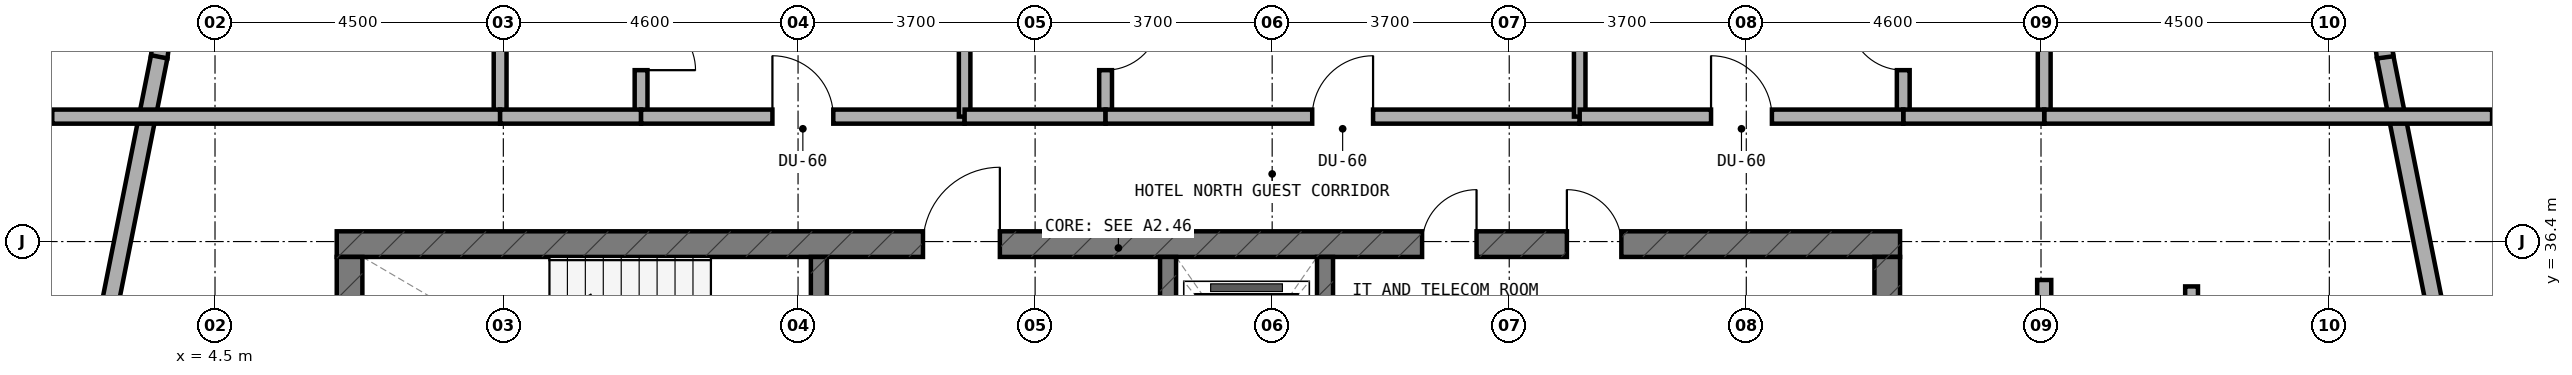
"""IFC4 building model, lengths in metres.
Left out: names, types, materials, properties, quantities, classifications, styles, units other than length and angle.
Written with IfcOpenShell. Run it as: python <this file> out.ifc"""

import sys

from ifc_helpers import new_model, si_unit, direction, frame, frame_2d, origin, place, context, subcontext, project, spatial, rectangle, extrude, element, fill, save


model = new_model("IFC4")
c1 = context("Model", 3, precision=1e-05, world=origin(), true_north=direction((0.0, 1.0)))
c2 = subcontext(c1, "Body", "Model", "MODEL_VIEW")
j1 = project(units=[si_unit("LENGTHUNIT", "METRE"), si_unit("PLANEANGLEUNIT", "RADIAN")], contexts=[c1])
p1 = place(None, origin())
s1 = spatial("IfcSite", under=j1, at=p1, CompositionType="ELEMENT")
p2 = place(p1, origin())
s2 = spatial("IfcBuilding", under=s1, at=p2, CompositionType="ELEMENT")
p3 = place(p2, frame((0.0, 0.0, 217.1)))
s3 = spatial("IfcBuildingStorey", under=s2, at=p3, CompositionType="ELEMENT", Elevation=217.1)
p4 = place(p3, frame((6.4, 36.36, 0.0), z_axis=(0.0, 0.0, 1.0), x_axis=(1.0, 0.0, 0.0)))
e1 = element("IfcWall", 1, at=p4, inside=s3, PredefinedType="SHEAR", context=c2, shape_type="SweptSolid", body=[
    extrude(rectangle(XDim=24.4, YDim=0.4, at=frame_2d((12.2, 0.0))), origin(), (0.0, 0.0, 1.0), 3.6),
])
p5 = place(p4, frame((9.15, 0.0, 0.0)))
e2 = element("IfcOpeningElement", 2, at=p5, cuts=e1, PredefinedType="OPENING", context=c2, shape_type="SweptSolid", body=[
    extrude(rectangle(XDim=1.2, YDim=2.15, at=frame_2d((0.6, 1.075))), frame((0.0, 0.21, 0.0), z_axis=(0.0, -1.0, 0.0), x_axis=(1.0, 0.0, 0.0)), (0.0, 0.0, 1.0), 0.42),
])
p6 = place(p4, frame((19.2, 0.0, 0.0)))
e3 = element("IfcOpeningElement", 3, at=p6, cuts=e1, PredefinedType="OPENING", context=c2, shape_type="SweptSolid", body=[
    extrude(rectangle(XDim=0.85, YDim=2.1, at=frame_2d((0.425, 1.05))), frame((0.0, 0.21, 0.0), z_axis=(0.0, -1.0, 0.0), x_axis=(1.0, 0.0, 0.0)), (0.0, 0.0, 1.0), 0.42),
])
p7 = place(p4, frame((16.94, 0.0, 0.0)))
e4 = element("IfcOpeningElement", 4, at=p7, cuts=e1, PredefinedType="OPENING", context=c2, shape_type="SweptSolid", body=[
    extrude(rectangle(XDim=0.85, YDim=2.1, at=frame_2d((0.425, 1.05))), frame((0.0, 0.21, 0.0), z_axis=(0.0, -1.0, 0.0), x_axis=(1.0, 0.0, 0.0)), (0.0, 0.0, 1.0), 0.42),
])
for number, where, z_axis, x_axis in (
    (5, (6.6, 33.0, 0.0), (0.0, 0.0, 1.0), (0.0, 1.0, 0.0)),
    (6, (30.6, 33.0, 0.0), (0.0, 0.0, 1.0), (0.0, 1.0, 0.0)),
):
    element("IfcWall", number, at=place(p3, frame(where, z_axis=z_axis, x_axis=x_axis)), inside=s3, PredefinedType="SHEAR", context=c2, shape_type="SweptSolid", body=[
        extrude(rectangle(XDim=3.16, YDim=0.4, at=frame_2d((1.58, 0.0))), origin(), (0.0, 0.0, 1.0), 3.6),
    ])
p8 = place(p3, frame((13.925, 33.0, 0.0), z_axis=(0.0, 0.0, 1.0), x_axis=(0.0, 1.0, 0.0)))
e7 = element("IfcWall", 7, at=p8, inside=s3, PredefinedType="STANDARD", context=c2, shape_type="SweptSolid", body=[
    extrude(rectangle(XDim=3.16, YDim=0.25, at=frame_2d((1.58, 0.0))), origin(), (0.0, 0.0, 1.0), 3.32),
])
p9 = place(p8, frame((0.98, 0.0, 0.0)))
e8 = element("IfcOpeningElement", 8, at=p9, cuts=e7, PredefinedType="OPENING", context=c2, shape_type="SweptSolid", body=[
    extrude(rectangle(XDim=1.1, YDim=2.15, at=frame_2d((0.55, 1.075))), frame((0.0, 0.135, 0.0), z_axis=(0.0, -1.0, 0.0), x_axis=(1.0, 0.0, 0.0)), (0.0, 0.0, 1.0), 0.27),
])
p10 = place(p3, frame((19.375, 33.0, 0.0), z_axis=(0.0, 0.0, 1.0), x_axis=(0.0, 1.0, 0.0)))
e9 = element("IfcWall", 9, at=p10, inside=s3, PredefinedType="STANDARD", context=c2, shape_type="SweptSolid", body=[
    extrude(rectangle(XDim=3.16, YDim=0.25, at=frame_2d((1.58, 0.0))), origin(), (0.0, 0.0, 1.0), 3.32),
])
p11 = place(p10, frame((0.98, 0.0, 0.0)))
e10 = element("IfcOpeningElement", 10, at=p11, cuts=e9, PredefinedType="OPENING", context=c2, shape_type="SweptSolid", body=[
    extrude(rectangle(XDim=1.1, YDim=2.15, at=frame_2d((0.55, 1.075))), frame((0.0, 0.135, 0.0), z_axis=(0.0, -1.0, 0.0), x_axis=(1.0, 0.0, 0.0)), (0.0, 0.0, 1.0), 0.27),
])
p12 = place(p3, frame((21.825, 33.0, 0.0), z_axis=(0.0, 0.0, 1.0), x_axis=(0.0, 1.0, 0.0)))
e11 = element("IfcWall", 11, at=p12, inside=s3, PredefinedType="STANDARD", context=c2, shape_type="SweptSolid", body=[
    extrude(rectangle(XDim=3.16, YDim=0.25, at=frame_2d((1.58, 0.0))), origin(), (0.0, 0.0, 1.0), 3.32),
])
p13 = place(p3, frame((40.084, 30.681, 0.0), z_axis=(0.0, 0.0, 1.0), x_axis=(-0.195291715883, 0.980745199176, 0.0)))
e12 = element("IfcWall", 12, at=p13, inside=s3, PredefinedType="STANDARD", context=c2, shape_type="SweptSolid", body=[
    extrude(rectangle(XDim=8.771, YDim=0.26, at=frame_2d((4.385, 0.0))), origin(), (0.0, 0.0, 1.0), 3.32),
])
p14 = place(p13, frame((2.798, 0.0, 0.85)))
e13 = element("IfcOpeningElement", 13, at=p14, cuts=e12, PredefinedType="OPENING", context=c2, shape_type="SweptSolid", body=[
    extrude(rectangle(XDim=2.1, YDim=1.5, at=frame_2d((1.05, 0.75))), frame((0.0, 0.14, 0.0), z_axis=(0.0, -1.0, 0.0), x_axis=(1.0, 0.0, 0.0)), (0.0, 0.0, 1.0), 0.28),
])
p15 = place(p3, frame((38.372, 39.275, 0.0), z_axis=(0.0, 0.0, 1.0), x_axis=(-0.130954667764, 0.9913883573, 0.0)))
e14 = element("IfcWall", 14, at=p15, inside=s3, PredefinedType="STANDARD", context=c2, shape_type="SweptSolid", body=[
    extrude(rectangle(XDim=0.833, YDim=0.26, at=frame_2d((0.417, 0.0))), origin(), (0.0, 0.0, 1.0), 3.32),
])
p16 = place(p3, frame((3.741, 40.136, 0.0), z_axis=(0.0, 0.0, 1.0), x_axis=(-0.130156359936, -0.991493480548, 0.0)))
e15 = element("IfcWall", 15, at=p16, inside=s3, PredefinedType="STANDARD", context=c2, shape_type="SweptSolid", body=[
    extrude(rectangle(XDim=0.868, YDim=0.26, at=frame_2d((0.434, 0.0))), origin(), (0.0, 0.0, 1.0), 3.32),
])
p17 = place(p3, frame((3.629, 39.283, 0.0), z_axis=(0.0, 0.0, 1.0), x_axis=(-0.195291715883, -0.980745199176, 0.0)))
e16 = element("IfcWall", 16, at=p17, inside=s3, PredefinedType="STANDARD", context=c2, shape_type="SweptSolid", body=[
    extrude(rectangle(XDim=8.771, YDim=0.26, at=frame_2d((4.385, 0.0))), origin(), (0.0, 0.0, 1.0), 3.32),
])
p18 = place(p17, frame((3.873, 0.0, 0.85)))
e17 = element("IfcOpeningElement", 17, at=p18, cuts=e16, PredefinedType="OPENING", context=c2, shape_type="SweptSolid", body=[
    extrude(rectangle(XDim=2.1, YDim=1.5, at=frame_2d((1.05, 0.75))), frame((0.0, 0.14, 0.0), z_axis=(0.0, -1.0, 0.0), x_axis=(1.0, 0.0, 0.0)), (0.0, 0.0, 1.0), 0.28),
])
p19 = place(p3, frame((11.15, 38.45, 0.0), z_axis=(0.0, 0.0, 1.0), x_axis=(0.0, 1.0, 0.0)))
e18 = element("IfcWall", 18, at=p19, inside=s3, PredefinedType="PLUMBINGWALL", context=c2, shape_type="SweptSolid", body=[
    extrude(rectangle(XDim=2.1, YDim=0.2, at=frame_2d((1.05, 0.0))), origin(), (0.0, 0.0, 1.0), 2.995),
])
p20 = place(p19, frame((0.625, 0.0, 0.0)))
e19 = element("IfcOpeningElement", 19, at=p20, cuts=e18, PredefinedType="OPENING", context=c2, shape_type="SweptSolid", body=[
    extrude(rectangle(XDim=0.85, YDim=2.1, at=frame_2d((0.425, 1.05))), frame((0.0, 0.11, 0.0), z_axis=(0.0, -1.0, 0.0), x_axis=(1.0, 0.0, 0.0)), (0.0, 0.0, 1.0), 0.22),
])
p21 = place(p3, frame((8.95, 38.45, 0.0), z_axis=(0.0, 0.0, 1.0), x_axis=(0.0, 1.0, 0.0)))
e20 = element("IfcWall", 20, at=p21, inside=s3, PredefinedType="PLUMBINGWALL", context=c2, shape_type="SweptSolid", body=[
    extrude(rectangle(XDim=2.1, YDim=0.2, at=frame_2d((1.05, 0.0))), origin(), (0.0, 0.0, 1.0), 2.995),
])
p22 = place(p3, frame((1.96, 38.35, 0.0), z_axis=(0.0, 0.0, 1.0), x_axis=(1.0, 0.0, 0.0)))
e21 = element("IfcWall", 21, at=p22, inside=s3, PredefinedType="SOLIDWALL", context=c2, shape_type="SweptSolid", body=[
    extrude(rectangle(XDim=6.99, YDim=0.22, at=frame_2d((3.495, 0.0))), origin(), (0.0, 0.0, 1.0), 2.695),
])
p23 = place(p3, frame((8.95, 38.35, 0.0), z_axis=(0.0, 0.0, 1.0), x_axis=(1.0, 0.0, 0.0)))
e22 = element("IfcWall", 22, at=p23, inside=s3, PredefinedType="SOLIDWALL", context=c2, shape_type="SweptSolid", body=[
    extrude(rectangle(XDim=2.2, YDim=0.22, at=frame_2d((1.1, 0.0))), origin(), (0.0, 0.0, 1.0), 3.32),
])
p24 = place(p3, frame((11.15, 38.35, 0.0), z_axis=(0.0, 0.0, 1.0), x_axis=(1.0, 0.0, 0.0)))
e23 = element("IfcWall", 23, at=p24, inside=s3, PredefinedType="SOLIDWALL", context=c2, shape_type="SweptSolid", body=[
    extrude(rectangle(XDim=5.05, YDim=0.22, at=frame_2d((2.525, 0.0))), origin(), (0.0, 0.0, 1.0), 2.695),
])
p25 = place(p24, frame((2.05, 0.0, 0.0)))
e24 = element("IfcOpeningElement", 24, at=p25, cuts=e23, PredefinedType="OPENING", context=c2, shape_type="SweptSolid", body=[
    extrude(rectangle(XDim=0.95, YDim=2.1, at=frame_2d((0.475, 1.05))), frame((0.0, 0.12, 0.0), z_axis=(0.0, -1.0, 0.0), x_axis=(1.0, 0.0, 0.0)), (0.0, 0.0, 1.0), 0.24),
])
p26 = place(p3, frame((16.2, 38.35, 0.0), z_axis=(0.0, 0.0, 1.0), x_axis=(0.0, 1.0, 0.0)))
e25 = element("IfcWall", 25, at=p26, inside=s3, PredefinedType="SOLIDWALL", context=c2, shape_type="SweptSolid", body=[
    extrude(rectangle(XDim=5.79, YDim=0.18, at=frame_2d((2.895, 0.0))), origin(), (0.0, 0.0, 1.0), 2.695),
])
p27 = place(p3, frame((18.4, 38.45, 0.0), z_axis=(0.0, 0.0, 1.0), x_axis=(0.0, 1.0, 0.0)))
e26 = element("IfcWall", 26, at=p27, inside=s3, PredefinedType="PLUMBINGWALL", context=c2, shape_type="SweptSolid", body=[
    extrude(rectangle(XDim=2.1, YDim=0.2, at=frame_2d((1.05, 0.0))), origin(), (0.0, 0.0, 1.0), 2.995),
])
p28 = place(p27, frame((0.625, 0.0, 0.0)))
e27 = element("IfcOpeningElement", 27, at=p28, cuts=e26, PredefinedType="OPENING", context=c2, shape_type="SweptSolid", body=[
    extrude(rectangle(XDim=0.85, YDim=2.1, at=frame_2d((0.425, 1.05))), frame((0.0, 0.11, 0.0), z_axis=(0.0, -1.0, 0.0), x_axis=(1.0, 0.0, 0.0)), (0.0, 0.0, 1.0), 0.22),
])
p29 = place(p3, frame((16.2, 38.35, 0.0), z_axis=(0.0, 0.0, 1.0), x_axis=(1.0, 0.0, 0.0)))
e28 = element("IfcWall", 28, at=p29, inside=s3, PredefinedType="SOLIDWALL", context=c2, shape_type="SweptSolid", body=[
    extrude(rectangle(XDim=2.2, YDim=0.22, at=frame_2d((1.1, 0.0))), origin(), (0.0, 0.0, 1.0), 2.695),
])
p30 = place(p3, frame((18.4, 38.35, 0.0), z_axis=(0.0, 0.0, 1.0), x_axis=(1.0, 0.0, 0.0)))
e29 = element("IfcWall", 29, at=p30, inside=s3, PredefinedType="SOLIDWALL", context=c2, shape_type="SweptSolid", body=[
    extrude(rectangle(XDim=7.4, YDim=0.22, at=frame_2d((3.7, 0.0))), origin(), (0.0, 0.0, 1.0), 2.695),
])
p31 = place(p30, frame((3.225, 0.0, 0.0)))
e30 = element("IfcOpeningElement", 30, at=p31, cuts=e29, PredefinedType="OPENING", context=c2, shape_type="SweptSolid", body=[
    extrude(rectangle(XDim=0.95, YDim=2.1, at=frame_2d((0.475, 1.05))), frame((0.0, 0.12, 0.0), z_axis=(0.0, -1.0, 0.0), x_axis=(1.0, 0.0, 0.0)), (0.0, 0.0, 1.0), 0.24),
])
p32 = place(p3, frame((25.8, 38.35, 0.0), z_axis=(0.0, 0.0, 1.0), x_axis=(0.0, 1.0, 0.0)))
e31 = element("IfcWall", 31, at=p32, inside=s3, PredefinedType="SOLIDWALL", context=c2, shape_type="SweptSolid", body=[
    extrude(rectangle(XDim=5.79, YDim=0.18, at=frame_2d((2.895, 0.0))), origin(), (0.0, 0.0, 1.0), 2.695),
])
p33 = place(p3, frame((30.85, 38.45, 0.0), z_axis=(0.0, 0.0, 1.0), x_axis=(0.0, 1.0, 0.0)))
e32 = element("IfcWall", 32, at=p33, inside=s3, PredefinedType="PLUMBINGWALL", context=c2, shape_type="SweptSolid", body=[
    extrude(rectangle(XDim=2.1, YDim=0.2, at=frame_2d((1.05, 0.0))), origin(), (0.0, 0.0, 1.0), 2.995),
])
p34 = place(p33, frame((0.625, 0.0, 0.0)))
e33 = element("IfcOpeningElement", 33, at=p34, cuts=e32, PredefinedType="OPENING", context=c2, shape_type="SweptSolid", body=[
    extrude(rectangle(XDim=0.85, YDim=2.1, at=frame_2d((0.425, 1.05))), frame((0.0, 0.11, 0.0), z_axis=(0.0, -1.0, 0.0), x_axis=(1.0, 0.0, 0.0)), (0.0, 0.0, 1.0), 0.22),
])
p35 = place(p3, frame((33.05, 38.45, 0.0), z_axis=(0.0, 0.0, 1.0), x_axis=(0.0, 1.0, 0.0)))
e34 = element("IfcWall", 34, at=p35, inside=s3, PredefinedType="PLUMBINGWALL", context=c2, shape_type="SweptSolid", body=[
    extrude(rectangle(XDim=2.1, YDim=0.2, at=frame_2d((1.05, 0.0))), origin(), (0.0, 0.0, 1.0), 2.995),
])
p36 = place(p3, frame((33.05, 38.35, 0.0), z_axis=(0.0, 0.0, 1.0), x_axis=(1.0, 0.0, 0.0)))
e35 = element("IfcWall", 35, at=p36, inside=s3, PredefinedType="SOLIDWALL", context=c2, shape_type="SweptSolid", body=[
    extrude(rectangle(XDim=6.99, YDim=0.22, at=frame_2d((3.495, 0.0))), origin(), (0.0, 0.0, 1.0), 2.695),
])
p37 = place(p3, frame((30.85, 38.35, 0.0), z_axis=(0.0, 0.0, 1.0), x_axis=(1.0, 0.0, 0.0)))
e36 = element("IfcWall", 36, at=p37, inside=s3, PredefinedType="SOLIDWALL", context=c2, shape_type="SweptSolid", body=[
    extrude(rectangle(XDim=2.2, YDim=0.22, at=frame_2d((1.1, 0.0))), origin(), (0.0, 0.0, 1.0), 3.32),
])
p38 = place(p3, frame((25.8, 38.35, 0.0), z_axis=(0.0, 0.0, 1.0), x_axis=(1.0, 0.0, 0.0)))
e37 = element("IfcWall", 37, at=p38, inside=s3, PredefinedType="SOLIDWALL", context=c2, shape_type="SweptSolid", body=[
    extrude(rectangle(XDim=5.05, YDim=0.22, at=frame_2d((2.525, 0.0))), origin(), (0.0, 0.0, 1.0), 2.695),
])
p39 = place(p38, frame((2.05, 0.0, 0.0)))
e38 = element("IfcOpeningElement", 38, at=p39, cuts=e37, PredefinedType="OPENING", context=c2, shape_type="SweptSolid", body=[
    extrude(rectangle(XDim=0.95, YDim=2.1, at=frame_2d((0.475, 1.05))), frame((0.0, 0.12, 0.0), z_axis=(0.0, -1.0, 0.0), x_axis=(1.0, 0.0, 0.0)), (0.0, 0.0, 1.0), 0.24),
])
p40 = place(p3, frame((35.35, 33.7, 0.0), z_axis=(0.0, 0.0, 1.0), x_axis=(0.0, 1.0, 0.0)))
e39 = element("IfcWall", 39, at=p40, inside=s3, PredefinedType="PLUMBINGWALL", context=c2, shape_type="SweptSolid", body=[
    extrude(rectangle(XDim=2.0, YDim=0.2, at=frame_2d((1.0, 0.0))), origin(), (0.0, 0.0, 1.0), 3.015),
])
p41 = place(p3, frame((33.05, 33.6, 0.0), z_axis=(0.0, 0.0, 1.0), x_axis=(0.0, 1.0, 0.0)))
e40 = element("IfcWall", 40, at=p41, inside=s3, PredefinedType="SOLIDWALL", context=c2, shape_type="SweptSolid", body=[
    extrude(rectangle(XDim=2.2, YDim=0.22, at=frame_2d((1.1, 0.0))), origin(), (0.0, 0.0, 1.0), 3.32),
])
p42 = place(p5, origin())
e41 = element("IfcDoor", 41, at=p42, inside=s3, OperationType="SINGLE_SWING_RIGHT", PredefinedType="DOOR", context=c2, shape_type="SweptSolid", body=[
    extrude(rectangle(XDim=1.2, YDim=2.15, at=frame_2d((0.6, 1.075))), frame((0.0, 0.025, 0.0), z_axis=(0.0, -1.0, 0.0), x_axis=(1.0, 0.0, 0.0)), (0.0, 0.0, 1.0), 0.05),
])
fill(e2, e41)
p43 = place(p6, origin())
e42 = element("IfcDoor", 42, at=p43, inside=s3, OperationType="SINGLE_SWING_LEFT", PredefinedType="DOOR", context=c2, shape_type="SweptSolid", body=[
    extrude(rectangle(XDim=0.85, YDim=2.1, at=frame_2d((0.425, 1.05))), frame((0.0, 0.025, 0.0), z_axis=(0.0, -1.0, 0.0), x_axis=(1.0, 0.0, 0.0)), (0.0, 0.0, 1.0), 0.05),
])
fill(e3, e42)
p44 = place(p7, origin())
e43 = element("IfcDoor", 43, at=p44, inside=s3, OperationType="SINGLE_SWING_RIGHT", PredefinedType="DOOR", context=c2, shape_type="SweptSolid", body=[
    extrude(rectangle(XDim=0.85, YDim=2.1, at=frame_2d((0.425, 1.05))), frame((0.0, 0.025, 0.0), z_axis=(0.0, -1.0, 0.0), x_axis=(1.0, 0.0, 0.0)), (0.0, 0.0, 1.0), 0.05),
])
fill(e4, e43)
p45 = place(p20, frame((0.85, 0.0, 0.0), z_axis=(0.0, 0.0, 1.0), x_axis=(-1.0, 0.0, 0.0)))
e44 = element("IfcDoor", 44, at=p45, inside=s3, OperationType="SINGLE_SWING_RIGHT", PredefinedType="DOOR", context=c2, shape_type="SweptSolid", body=[
    extrude(rectangle(XDim=0.85, YDim=2.1, at=frame_2d((0.425, 1.05))), frame((0.0, 0.025, 0.0), z_axis=(0.0, -1.0, 0.0), x_axis=(1.0, 0.0, 0.0)), (0.0, 0.0, 1.0), 0.05),
])
fill(e19, e44)
p46 = place(p25, origin())
e45 = element("IfcDoor", 45, at=p46, inside=s3, OperationType="SINGLE_SWING_LEFT", PredefinedType="DOOR", context=c2, shape_type="SweptSolid", body=[
    extrude(rectangle(XDim=0.95, YDim=2.1, at=frame_2d((0.475, 1.05))), frame((0.0, 0.025, 0.0), z_axis=(0.0, -1.0, 0.0), x_axis=(1.0, 0.0, 0.0)), (0.0, 0.0, 1.0), 0.05),
])
fill(e24, e45)
p47 = place(p28, frame((0.85, 0.0, 0.0), z_axis=(0.0, 0.0, 1.0), x_axis=(-1.0, 0.0, 0.0)))
e46 = element("IfcDoor", 46, at=p47, inside=s3, OperationType="SINGLE_SWING_LEFT", PredefinedType="DOOR", context=c2, shape_type="SweptSolid", body=[
    extrude(rectangle(XDim=0.85, YDim=2.1, at=frame_2d((0.425, 1.05))), frame((0.0, 0.025, 0.0), z_axis=(0.0, -1.0, 0.0), x_axis=(1.0, 0.0, 0.0)), (0.0, 0.0, 1.0), 0.05),
])
fill(e27, e46)
p48 = place(p31, origin())
e47 = element("IfcDoor", 47, at=p48, inside=s3, OperationType="SINGLE_SWING_RIGHT", PredefinedType="DOOR", context=c2, shape_type="SweptSolid", body=[
    extrude(rectangle(XDim=0.95, YDim=2.1, at=frame_2d((0.475, 1.05))), frame((0.0, 0.025, 0.0), z_axis=(0.0, -1.0, 0.0), x_axis=(1.0, 0.0, 0.0)), (0.0, 0.0, 1.0), 0.05),
])
fill(e30, e47)
p49 = place(p34, origin())
e48 = element("IfcDoor", 48, at=p49, inside=s3, OperationType="SINGLE_SWING_RIGHT", PredefinedType="DOOR", context=c2, shape_type="SweptSolid", body=[
    extrude(rectangle(XDim=0.85, YDim=2.1, at=frame_2d((0.425, 1.05))), frame((0.0, 0.025, 0.0), z_axis=(0.0, -1.0, 0.0), x_axis=(1.0, 0.0, 0.0)), (0.0, 0.0, 1.0), 0.05),
])
fill(e33, e48)
p50 = place(p39, origin())
e49 = element("IfcDoor", 49, at=p50, inside=s3, OperationType="SINGLE_SWING_LEFT", PredefinedType="DOOR", context=c2, shape_type="SweptSolid", body=[
    extrude(rectangle(XDim=0.95, YDim=2.1, at=frame_2d((0.475, 1.05))), frame((0.0, 0.025, 0.0), z_axis=(0.0, -1.0, 0.0), x_axis=(1.0, 0.0, 0.0)), (0.0, 0.0, 1.0), 0.05),
])
fill(e38, e49)
save(model, sys.argv[1])
